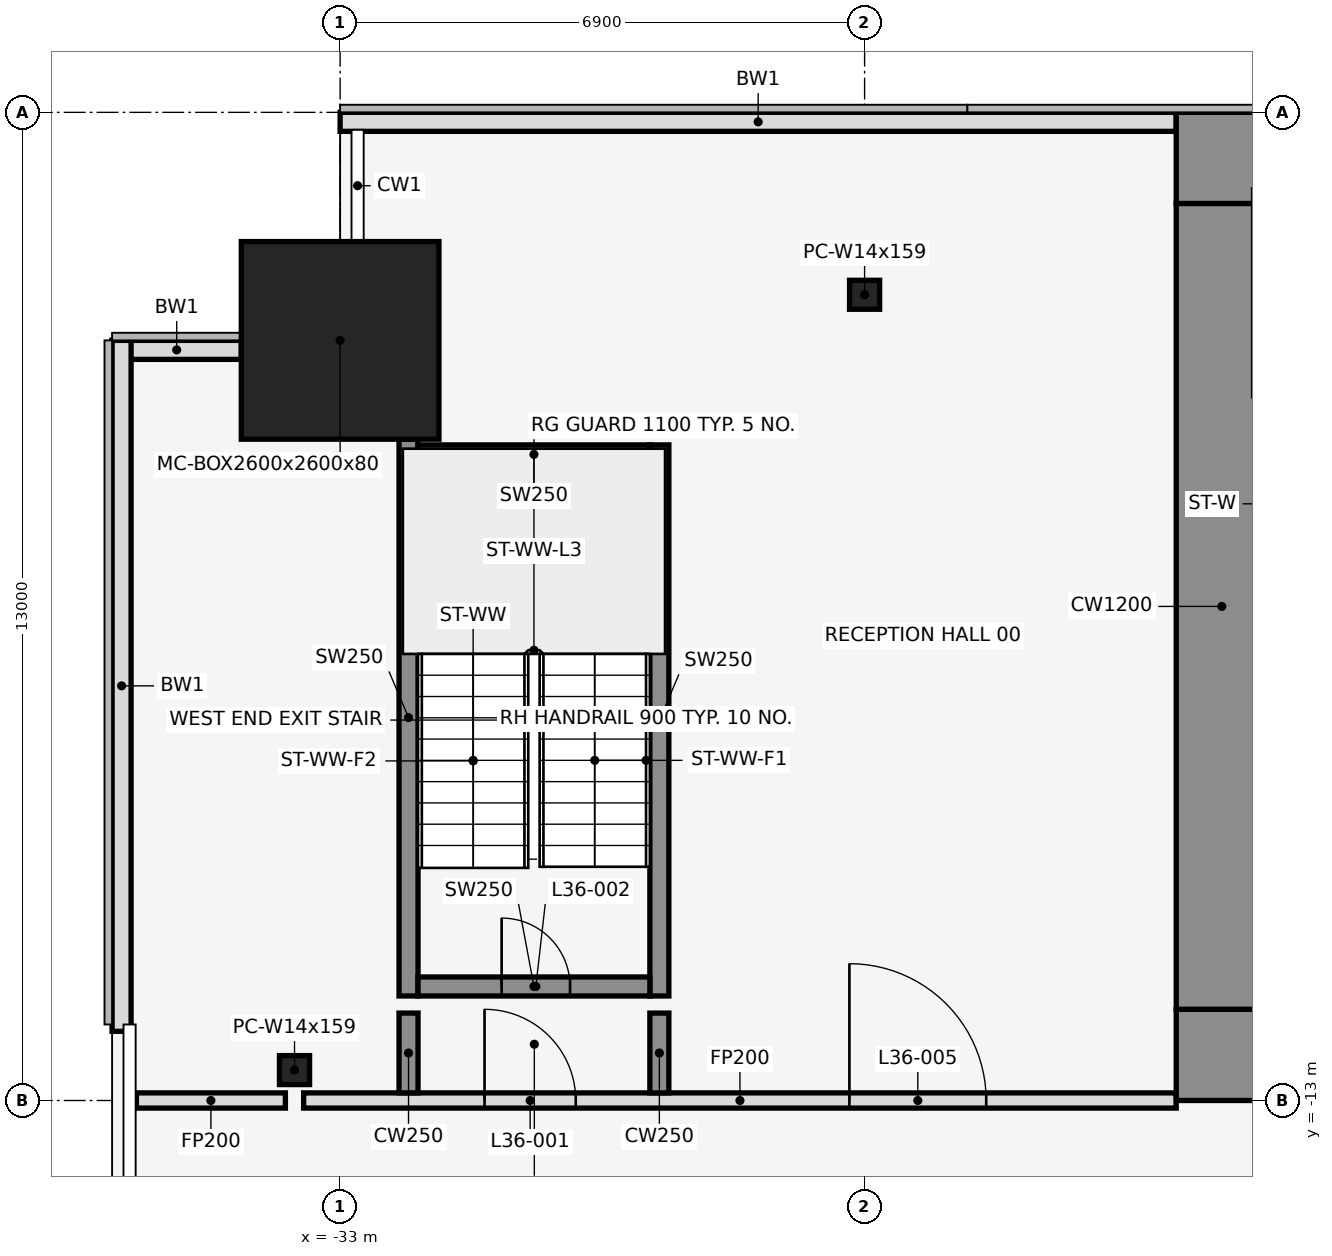
"""IFC4 building model, lengths in metres.
Left out: names, types, materials, properties, quantities, classifications, styles, units other than length and angle.
Written with IfcOpenShell. Run it as: python <this file> out.ifc"""

import sys

from ifc_helpers import new_model, si_unit, direction, frame, frame_2d, origin, origin_2d, place, context, subcontext, project, spatial, rectangle, hollow_rectangle, i_section, extrude, element, fill, save


model = new_model("IFC4")
c1 = context("Model", 3, precision=1e-05, world=origin(), true_north=direction((0.0, 1.0)))
c2 = subcontext(c1, "Body", "Model", "MODEL_VIEW")
j1 = project(units=[si_unit("LENGTHUNIT", "METRE"), si_unit("PLANEANGLEUNIT", "RADIAN")], contexts=[c1])
p1 = place(None, origin())
s1 = spatial("IfcSite", under=j1, at=p1, CompositionType="ELEMENT")
p2 = place(p1, origin())
s2 = spatial("IfcBuilding", under=s1, at=p2, CompositionType="ELEMENT")
p3 = place(p2, frame((0.0, 0.0, 165.0)))
s3 = spatial("IfcBuildingStorey", under=s2, at=p3, CompositionType="ELEMENT", Elevation=165.0)
p4 = place(p3, frame((-33.0, -3.0, 0.0), z_axis=(0.0, 0.0, 1.0), x_axis=(1.0, 0.0, 0.0)))
e1 = element("IfcColumn", 1, at=p4, inside=s3, PredefinedType="COLUMN", context=c2, shape_type="SweptSolid", body=[
    extrude(hollow_rectangle(XDim=2.6, YDim=2.6, WallThickness=0.08, at=origin_2d()), origin(), (0.0, 0.0, 1.0), 4.1),
])
for number, where, z_axis, x_axis in (
    (2, (-26.1, -2.4, 0.0), (0.0, 0.0, 1.0), (1.0, 0.0, 0.0)),
    (3, (-33.6, -12.6, 0.0), (0.0, 0.0, 1.0), (1.0, 0.0, 0.0)),
):
    element("IfcColumn", number, at=place(p3, frame(where, z_axis=z_axis, x_axis=x_axis)), inside=s3, PredefinedType="COLUMN", context=c2, shape_type="SweptSolid", body=[
        extrude(i_section(OverallWidth=0.396, OverallDepth=0.381, WebThickness=0.019, FlangeThickness=0.03, at=origin_2d()), origin(), (0.0, 0.0, 1.0), 4.1),
    ])
p5 = place(p3, frame((-22.0, -0.125, 0.0), z_axis=(0.0, 0.0, 1.0), x_axis=(-1.0, 0.0, 0.0)))
e4 = element("IfcWall", 4, at=p5, inside=s3, PredefinedType="STANDARD", context=c2, shape_type="SweptSolid", body=[
    extrude(rectangle(XDim=11.0, YDim=0.25, at=frame_2d((5.5, 0.0))), origin(), (0.0, 0.0, 1.0), 3.95),
])
p6 = place(p3, frame((-34.3, -3.125, 0.0), z_axis=(0.0, 0.0, 1.0), x_axis=(-1.0, 0.0, 0.0)))
e5 = element("IfcWall", 5, at=p6, inside=s3, PredefinedType="STANDARD", context=c2, shape_type="SweptSolid", body=[
    extrude(rectangle(XDim=1.7, YDim=0.25, at=frame_2d((0.85, 0.0))), origin(), (0.0, 0.0, 1.0), 3.95),
])
p7 = place(p3, frame((-35.875, -3.0, 0.0), z_axis=(0.0, 0.0, 1.0), x_axis=(0.0, -1.0, 0.0)))
e6 = element("IfcWall", 6, at=p7, inside=s3, PredefinedType="STANDARD", context=c2, shape_type="SweptSolid", body=[
    extrude(rectangle(XDim=9.09, YDim=0.25, at=frame_2d((4.545, 0.0))), origin(), (0.0, 0.0, 1.0), 3.95),
])
p8 = place(p3, frame((-32.1, -11.625, 0.0), z_axis=(0.0, 0.0, 1.0), x_axis=(0.0, 1.0, 0.0)))
e7 = element("IfcWall", 7, at=p8, inside=s3, PredefinedType="SHEAR", context=c2, shape_type="SweptSolid", body=[
    extrude(rectangle(XDim=7.325, YDim=0.25, at=frame_2d((3.663, 0.0))), origin(), (0.0, 0.0, 1.0), 4.1),
])
p9 = place(p3, frame((-28.8, -11.625, 0.0), z_axis=(0.0, 0.0, 1.0), x_axis=(0.0, 1.0, 0.0)))
e8 = element("IfcWall", 8, at=p9, inside=s3, PredefinedType="SHEAR", context=c2, shape_type="SweptSolid", body=[
    extrude(rectangle(XDim=7.25, YDim=0.25, at=frame_2d((3.625, 0.0))), origin(), (0.0, 0.0, 1.0), 4.1),
])
p10 = place(p3, frame((-31.975, -11.5, 0.0), z_axis=(0.0, 0.0, 1.0), x_axis=(1.0, 0.0, 0.0)))
e9 = element("IfcWall", 9, at=p10, inside=s3, PredefinedType="SHEAR", context=c2, shape_type="SweptSolid", body=[
    extrude(rectangle(XDim=3.05, YDim=0.25, at=frame_2d((1.525, 0.0))), origin(), (0.0, 0.0, 1.0), 4.1),
])
p11 = place(p10, frame((1.1, 0.0, 0.0)))
e10 = element("IfcOpeningElement", 10, at=p11, cuts=e9, PredefinedType="OPENING", context=c2, shape_type="SweptSolid", body=[
    extrude(rectangle(XDim=0.9, YDim=2.1, at=frame_2d((0.45, 1.05))), frame((0.0, 0.137, 0.0), z_axis=(0.0, -1.0, 0.0), x_axis=(1.0, 0.0, 0.0)), (0.0, 0.0, 1.0), 0.274),
])
p12 = place(p3, frame((-31.975, -4.5, 0.0), z_axis=(0.0, 0.0, 1.0), x_axis=(1.0, 0.0, 0.0)))
e11 = element("IfcWall", 11, at=p12, inside=s3, PredefinedType="SHEAR", context=c2, shape_type="SweptSolid", body=[
    extrude(rectangle(XDim=3.05, YDim=0.25, at=frame_2d((1.525, 0.0))), origin(), (0.0, 0.0, 1.0), 4.1),
])
p13 = place(p3, frame((-35.68, -13.0, 0.0), z_axis=(0.0, 0.0, 1.0), x_axis=(1.0, 0.0, 0.0)))
e12 = element("IfcWall", 12, at=p13, inside=s3, PredefinedType="PARTITIONING", context=c2, shape_type="SweptSolid", body=[
    extrude(rectangle(XDim=1.96, YDim=0.2, at=frame_2d((0.98, 0.0))), origin(), (0.0, 0.0, 1.0), 2.84),
])
p14 = place(p3, frame((-33.48, -13.0, 0.0), z_axis=(0.0, 0.0, 1.0), x_axis=(1.0, 0.0, 0.0)))
e13 = element("IfcWall", 13, at=p14, inside=s3, PredefinedType="PARTITIONING", context=c2, shape_type="SweptSolid", body=[
    extrude(rectangle(XDim=11.48, YDim=0.2, at=frame_2d((5.74, 0.0))), origin(), (0.0, 0.0, 1.0), 2.84),
])
p15 = place(p14, frame((2.38, 0.0, 0.0)))
e14 = element("IfcOpeningElement", 14, at=p15, cuts=e13, PredefinedType="OPENING", context=c2, shape_type="SweptSolid", body=[
    extrude(rectangle(XDim=1.2, YDim=2.1, at=frame_2d((0.6, 1.05))), frame((0.0, 0.112, 0.0), z_axis=(0.0, -1.0, 0.0), x_axis=(1.0, 0.0, 0.0)), (0.0, 0.0, 1.0), 0.224),
])
p16 = place(p14, frame((7.18, 0.0, 0.0)))
e15 = element("IfcOpeningElement", 15, at=p16, cuts=e13, PredefinedType="OPENING", context=c2, shape_type="SweptSolid", body=[
    extrude(rectangle(XDim=1.8, YDim=2.1, at=frame_2d((0.9, 1.05))), frame((0.0, 0.112, 0.0), z_axis=(0.0, -1.0, 0.0), x_axis=(1.0, 0.0, 0.0)), (0.0, 0.0, 1.0), 0.224),
])
for number, where, z_axis, x_axis in (
    (16, (-32.1, -12.9, 0.0), (0.0, 0.0, 1.0), (0.0, 1.0, 0.0)),
    (17, (-28.8, -12.9, 0.0), (0.0, 0.0, 1.0), (0.0, 1.0, 0.0)),
):
    element("IfcWall", number, at=place(p3, frame(where, z_axis=z_axis, x_axis=x_axis)), inside=s3, PredefinedType="SHEAR", context=c2, shape_type="SweptSolid", body=[
        extrude(rectangle(XDim=1.05, YDim=0.25, at=frame_2d((0.525, 0.0))), origin(), (0.0, 0.0, 1.0), 4.1),
    ])
p17 = place(p3, frame((-22.0, -0.6, 0.0), z_axis=(0.0, 0.0, 1.0), x_axis=(1.0, 0.0, 0.0)))
e18 = element("IfcWall", 18, at=p17, inside=s3, PredefinedType="SHEAR", context=c2, shape_type="SweptSolid", body=[
    extrude(rectangle(XDim=44.0, YDim=1.2, at=frame_2d((22.0, 0.0))), origin(), (0.0, 0.0, 1.0), 4.1),
])
p18 = place(p17, frame((18.55, 0.0, 0.0)))
e19 = element("IfcOpeningElement", 19, at=p18, cuts=e18, PredefinedType="OPENING", context=c2, shape_type="SweptSolid", body=[
    extrude(rectangle(XDim=0.9, YDim=2.1, at=frame_2d((0.45, 1.05))), frame((0.0, 0.612, 0.0), z_axis=(0.0, -1.0, 0.0), x_axis=(1.0, 0.0, 0.0)), (0.0, 0.0, 1.0), 1.224),
])
p19 = place(p17, frame((24.55, 0.0, 0.0)))
e20 = element("IfcOpeningElement", 20, at=p19, cuts=e18, PredefinedType="OPENING", context=c2, shape_type="SweptSolid", body=[
    extrude(rectangle(XDim=0.9, YDim=2.1, at=frame_2d((0.45, 1.05))), frame((0.0, 0.612, 0.0), z_axis=(0.0, -1.0, 0.0), x_axis=(1.0, 0.0, 0.0)), (0.0, 0.0, 1.0), 1.224),
])
p20 = place(p3, frame((-22.0, -12.4, 0.0), z_axis=(0.0, 0.0, 1.0), x_axis=(1.0, 0.0, 0.0)))
e21 = element("IfcWall", 21, at=p20, inside=s3, PredefinedType="SHEAR", context=c2, shape_type="SweptSolid", body=[
    extrude(rectangle(XDim=44.0, YDim=1.2, at=frame_2d((22.0, 0.0))), origin(), (0.0, 0.0, 1.0), 4.1),
])
p21 = place(p20, frame((2.2, 0.0, 0.0)))
e22 = element("IfcOpeningElement", 22, at=p21, cuts=e21, PredefinedType="OPENING", context=c2, shape_type="SweptSolid", body=[
    extrude(rectangle(XDim=1.2, YDim=2.1, at=frame_2d((0.6, 1.05))), frame((0.0, 0.612, 0.0), z_axis=(0.0, -1.0, 0.0), x_axis=(1.0, 0.0, 0.0)), (0.0, 0.0, 1.0), 1.224),
])
p22 = place(p20, frame((21.4, 0.0, 0.0)))
e23 = element("IfcOpeningElement", 23, at=p22, cuts=e21, PredefinedType="OPENING", context=c2, shape_type="SweptSolid", body=[
    extrude(rectangle(XDim=1.2, YDim=2.1, at=frame_2d((0.6, 1.05))), frame((0.0, 0.612, 0.0), z_axis=(0.0, -1.0, 0.0), x_axis=(1.0, 0.0, 0.0)), (0.0, 0.0, 1.0), 1.224),
])
p23 = place(p20, frame((40.6, 0.0, 0.0)))
e24 = element("IfcOpeningElement", 24, at=p23, cuts=e21, PredefinedType="OPENING", context=c2, shape_type="SweptSolid", body=[
    extrude(rectangle(XDim=1.2, YDim=2.1, at=frame_2d((0.6, 1.05))), frame((0.0, 0.612, 0.0), z_axis=(0.0, -1.0, 0.0), x_axis=(1.0, 0.0, 0.0)), (0.0, 0.0, 1.0), 1.224),
])
p24 = place(p20, frame((16.0, 0.0, 0.0)))
e25 = element("IfcOpeningElement", 25, at=p24, cuts=e21, PredefinedType="OPENING", context=c2, shape_type="SweptSolid", body=[
    extrude(rectangle(XDim=1.8, YDim=2.1, at=frame_2d((0.9, 1.05))), frame((0.0, 0.612, 0.0), z_axis=(0.0, -1.0, 0.0), x_axis=(1.0, 0.0, 0.0)), (0.0, 0.0, 1.0), 1.224),
])
p25 = place(p20, frame((6.3, 0.0, 0.0)))
e26 = element("IfcOpeningElement", 26, at=p25, cuts=e21, PredefinedType="OPENING", context=c2, shape_type="SweptSolid", body=[
    extrude(rectangle(XDim=1.2, YDim=2.1, at=frame_2d((0.6, 1.05))), frame((0.0, 0.612, 0.0), z_axis=(0.0, -1.0, 0.0), x_axis=(1.0, 0.0, 0.0)), (0.0, 0.0, 1.0), 1.224),
])
p26 = place(p20, frame((26.2, 0.0, 0.0)))
e27 = element("IfcOpeningElement", 27, at=p26, cuts=e21, PredefinedType="OPENING", context=c2, shape_type="SweptSolid", body=[
    extrude(rectangle(XDim=1.8, YDim=2.1, at=frame_2d((0.9, 1.05))), frame((0.0, 0.612, 0.0), z_axis=(0.0, -1.0, 0.0), x_axis=(1.0, 0.0, 0.0)), (0.0, 0.0, 1.0), 1.224),
])
p27 = place(p20, frame((36.5, 0.0, 0.0)))
e28 = element("IfcOpeningElement", 28, at=p27, cuts=e21, PredefinedType="OPENING", context=c2, shape_type="SweptSolid", body=[
    extrude(rectangle(XDim=1.2, YDim=2.1, at=frame_2d((0.6, 1.05))), frame((0.0, 0.612, 0.0), z_axis=(0.0, -1.0, 0.0), x_axis=(1.0, 0.0, 0.0)), (0.0, 0.0, 1.0), 1.224),
])
p28 = place(p3, frame((-21.4, -11.8, 0.0), z_axis=(0.0, 0.0, 1.0), x_axis=(0.0, 1.0, 0.0)))
e29 = element("IfcWall", 29, at=p28, inside=s3, PredefinedType="SHEAR", context=c2, shape_type="SweptSolid", body=[
    extrude(rectangle(XDim=10.6, YDim=1.2, at=frame_2d((5.3, 0.0))), origin(), (0.0, 0.0, 1.0), 4.1),
])
p29 = place(p15, origin())
e30 = element("IfcDoor", 30, at=p29, inside=s3, OperationType="SINGLE_SWING_LEFT", PredefinedType="DOOR", context=c2, shape_type="SweptSolid", body=[
    extrude(rectangle(XDim=1.2, YDim=2.1, at=frame_2d((0.6, 1.05))), frame((0.0, 0.025, 0.0), z_axis=(0.0, -1.0, 0.0), x_axis=(1.0, 0.0, 0.0)), (0.0, 0.0, 1.0), 0.05),
])
fill(e14, e30)
p30 = place(p11, origin())
e31 = element("IfcDoor", 31, at=p30, inside=s3, OperationType="SINGLE_SWING_LEFT", PredefinedType="DOOR", context=c2, shape_type="SweptSolid", body=[
    extrude(rectangle(XDim=0.9, YDim=2.1, at=frame_2d((0.45, 1.05))), frame((0.0, 0.025, 0.0), z_axis=(0.0, -1.0, 0.0), x_axis=(1.0, 0.0, 0.0)), (0.0, 0.0, 1.0), 0.05),
])
fill(e10, e31)
p31 = place(p16, origin())
e32 = element("IfcDoor", 32, at=p31, inside=s3, OperationType="SINGLE_SWING_LEFT", PredefinedType="DOOR", context=c2, shape_type="SweptSolid", body=[
    extrude(rectangle(XDim=1.8, YDim=2.1, at=frame_2d((0.9, 1.05))), frame((0.0, 0.025, 0.0), z_axis=(0.0, -1.0, 0.0), x_axis=(1.0, 0.0, 0.0)), (0.0, 0.0, 1.0), 0.05),
])
fill(e15, e32)
save(model, sys.argv[1])
